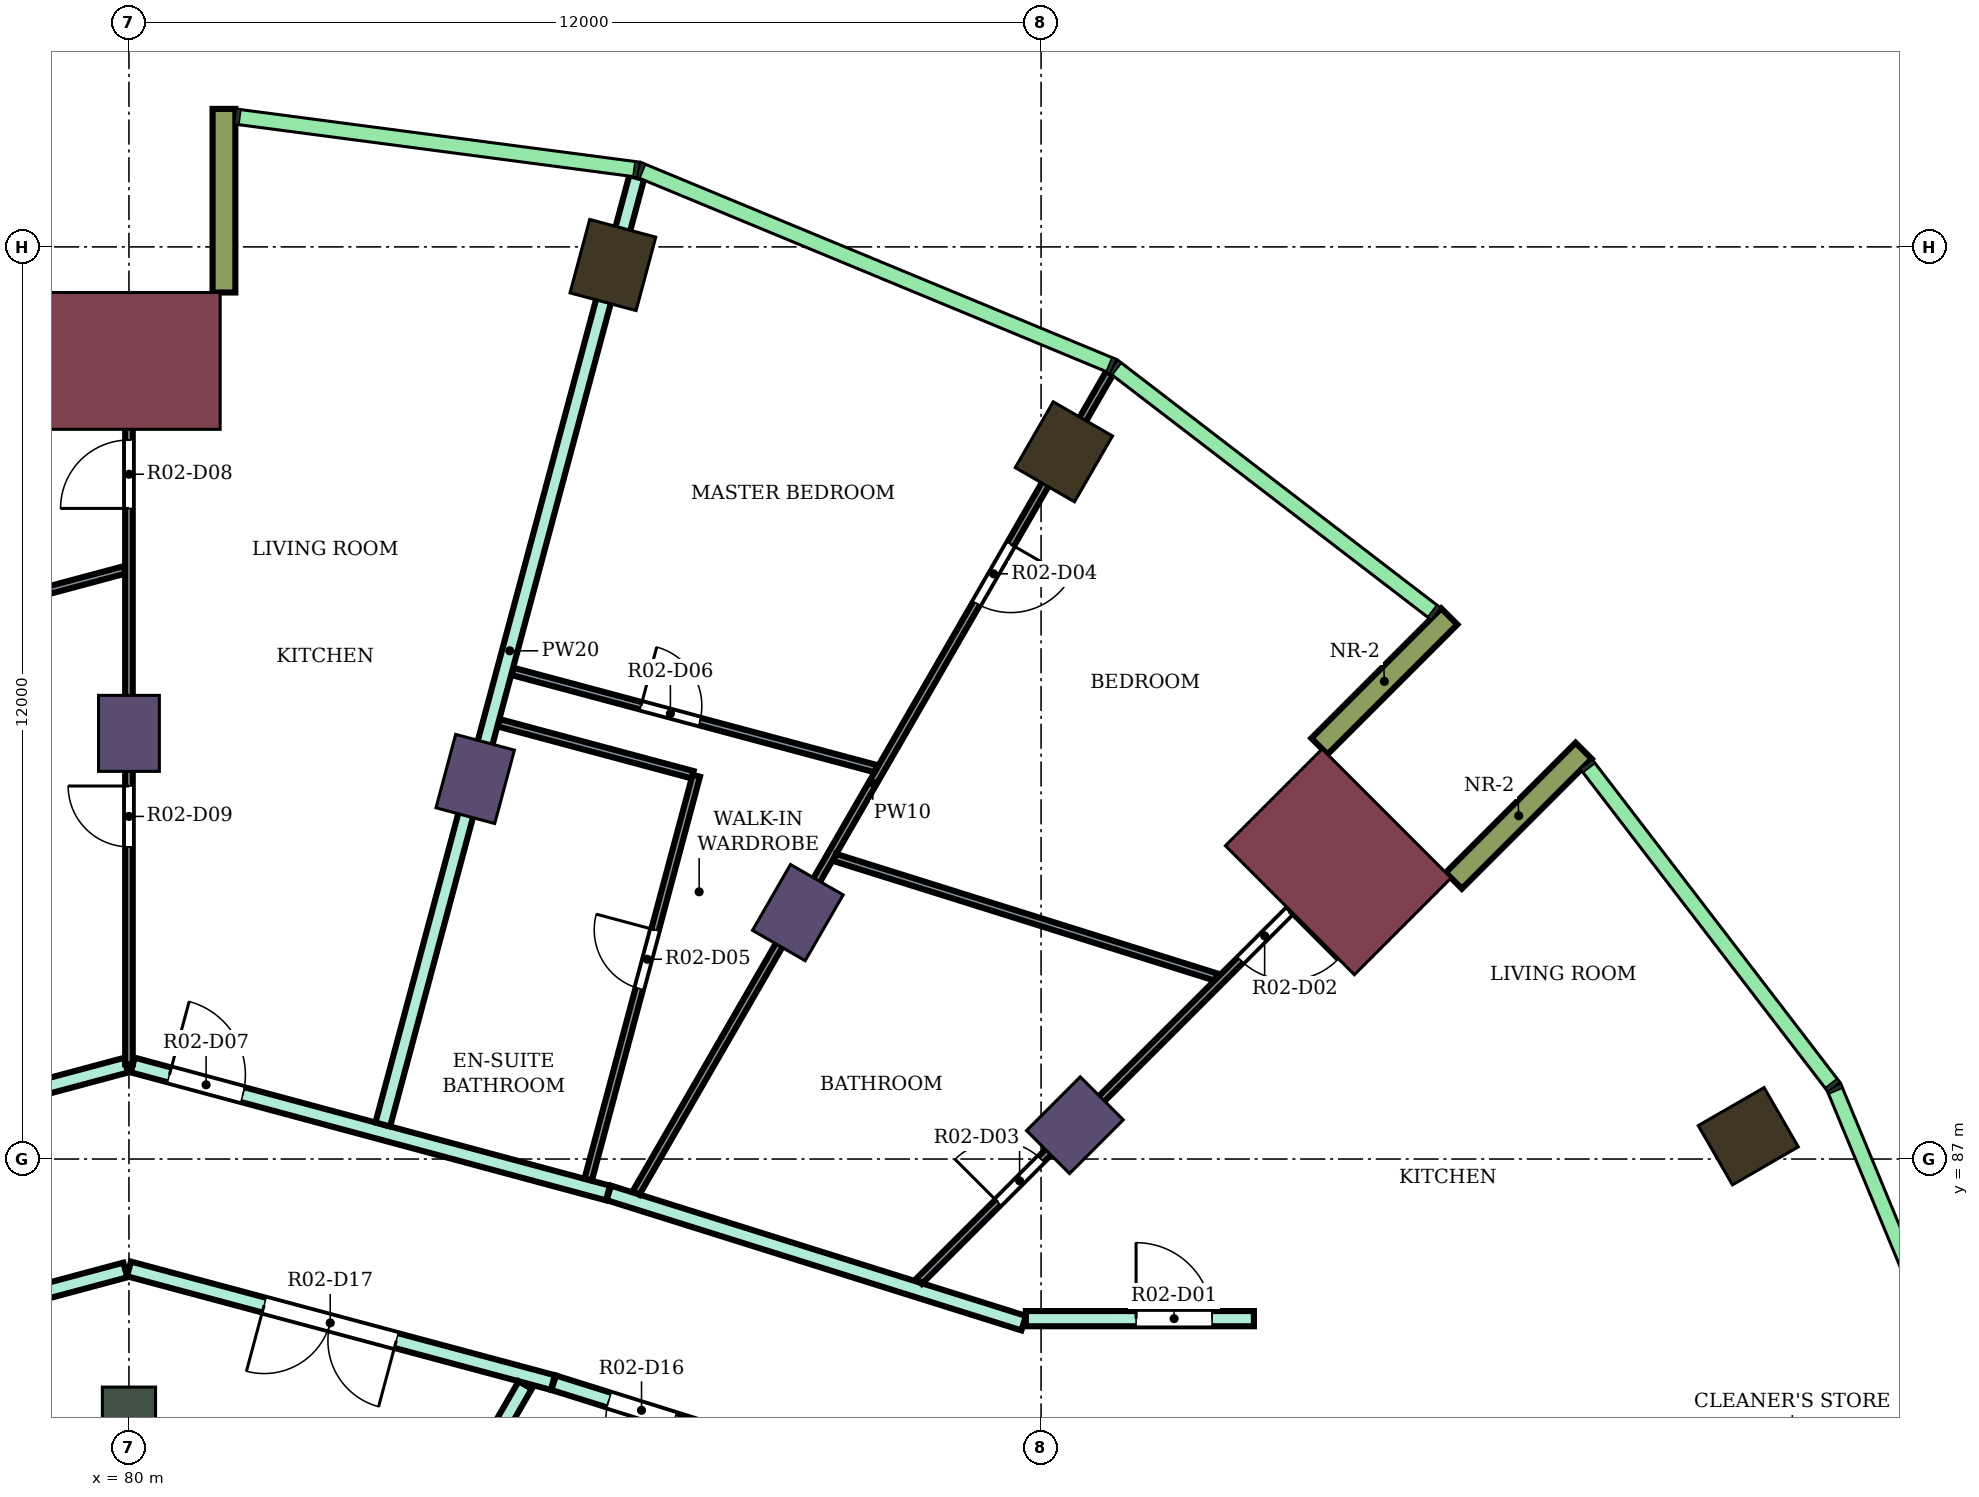
"""IFC4 building model, lengths in metres.
Left out: names, types, materials, properties, quantities, classifications, styles, units other than length and angle.
Written with IfcOpenShell. Run it as: python <this file> out.ifc"""

import sys

from ifc_helpers import new_model, si_unit, direction, frame, frame_2d, origin, origin_2d, place, context, subcontext, project, spatial, rectangle, extrude, element, fill, save


model = new_model("IFC4")
c1 = context("Model", 3, precision=1e-05, world=origin(), true_north=direction((0.0, 1.0)))
c2 = subcontext(c1, "Body", "Model", "MODEL_VIEW")
j1 = project(units=[si_unit("LENGTHUNIT", "METRE"), si_unit("PLANEANGLEUNIT", "RADIAN")], contexts=[c1])
p1 = place(None, origin())
s1 = spatial("IfcSite", under=j1, at=p1, CompositionType="ELEMENT")
p2 = place(p1, origin())
s2 = spatial("IfcBuilding", under=s1, at=p2, CompositionType="ELEMENT")
p3 = place(p2, frame((0.0, 0.0, 170.0)))
s3 = spatial("IfcBuildingStorey", under=s2, at=p3, CompositionType="ELEMENT", Elevation=170.0)
for number, where, z_axis, x_axis in (
    (1, (101.304, 87.3, 0.0), (0.0, 0.0, 1.0), (0.866, 0.5, 0.0)),
    (2, (92.3, 96.304, 0.0), (0.0, 0.0, 1.0), (0.5, 0.866, 0.0)),
    (3, (86.367, 98.762, 0.0), (0.0, 0.0, 1.0), (0.259, 0.966, 0.0)),
):
    element("IfcColumn", number, at=place(p3, frame(where, z_axis=z_axis, x_axis=x_axis)), inside=s3, PredefinedType="COLUMN", context=c2, shape_type="SweptSolid", body=[
        extrude(rectangle(XDim=1.0, YDim=0.9, at=origin_2d()), origin(), (0.0, 0.0, 1.0), 4.1),
    ])
for number, where, z_axis, x_axis in (
    (4, (92.445, 87.445, 0.0), (0.0, 0.0, 1.0), (0.707, 0.707, 0.0)),
    (5, (88.8, 90.242, 0.0), (0.0, 0.0, 1.0), (0.5, 0.866, 0.0)),
    (6, (84.555, 92.0, 0.0), (0.0, 0.0, 1.0), (0.259, 0.966, 0.0)),
    (7, (80.0, 92.6, 0.0), (0.0, 0.0, 1.0), (0.0, 1.0, 0.0)),
):
    element("IfcColumn", number, at=place(p3, frame(where, z_axis=z_axis, x_axis=x_axis)), inside=s3, PredefinedType="COLUMN", context=c2, shape_type="SweptSolid", body=[
        extrude(rectangle(XDim=1.0, YDim=0.8, at=origin_2d()), origin(), (0.0, 0.0, 1.0), 4.1),
    ])
p4 = place(p3, frame((80.0, 83.6, 0.0), z_axis=(0.0, 0.0, 1.0), x_axis=(0.0, 1.0, 0.0)))
e8 = element("IfcColumn", 8, at=p4, inside=s3, PredefinedType="COLUMN", context=c2, shape_type="SweptSolid", body=[
    extrude(rectangle(XDim=0.8, YDim=0.7, at=origin_2d()), origin(), (0.0, 0.0, 1.0), 4.1),
])
for number, where, z_axis, x_axis in (
    (9, (95.91, 90.91, 0.0), (0.0, 0.0, 1.0), (0.707, 0.707, 0.0)),
    (10, (80.0, 97.5, 0.0), (0.0, 0.0, 1.0), (0.0, 1.0, 0.0)),
):
    element("IfcColumn", number, at=place(p3, frame(where, z_axis=z_axis, x_axis=x_axis)), inside=s3, PredefinedType="COLUMN", context=c2, shape_type="SweptSolid", body=[
        extrude(rectangle(XDim=1.8, YDim=2.4, at=origin_2d()), origin(), (0.0, 0.0, 1.0), 4.1),
    ])
for number, where, z_axis, x_axis in (
    (11, (97.43, 90.662, 0.0), (0.0, 0.0, 1.0), (0.707, 0.707, 0.0)),
    (12, (95.662, 92.43, 0.0), (0.0, 0.0, 1.0), (0.707, 0.707, 0.0)),
    (13, (81.25, 98.4, 0.0), (0.0, 0.0, 1.0), (0.0, 1.0, 0.0)),
):
    element("IfcWall", number, at=place(p3, frame(where, z_axis=z_axis, x_axis=x_axis)), inside=s3, PredefinedType="NOTDEFINED", context=c2, shape_type="SweptSolid", body=[
        extrude(rectangle(XDim=2.416, YDim=0.3, at=frame_2d((1.208, 0.0))), origin(), (0.0, 0.0, 1.0), 4.1),
    ])
p5 = place(p3, frame((73.687, 86.554, 0.0), z_axis=(0.0, 0.0, 1.0), x_axis=(0.96595928904, 0.258694128106, 0.0)))
e14 = element("IfcWall", 14, at=p5, inside=s3, PredefinedType="PARTITIONING", context=c2, shape_type="SweptSolid", body=[
    extrude(rectangle(XDim=6.496, YDim=0.2, at=frame_2d((3.248, 0.0))), origin(), (0.0, 0.0, 1.0), 3.65),
])
p6 = place(p3, frame((74.413, 84.057, 0.0), z_axis=(0.0, 0.0, 1.0), x_axis=(0.965970849692, 0.258650956976, 0.0)))
e15 = element("IfcWall", 15, at=p6, inside=s3, PredefinedType="PARTITIONING", context=c2, shape_type="SweptSolid", body=[
    extrude(rectangle(XDim=5.734, YDim=0.2, at=frame_2d((2.867, 0.0))), origin(), (0.0, 0.0, 1.0), 3.65),
])
p7 = place(p3, frame((80.0, 85.554, 0.0), z_axis=(0.0, 0.0, 1.0), x_axis=(0.965894438951, -0.258936155845, 0.0)))
e16 = element("IfcWall", 16, at=p7, inside=s3, PredefinedType="PARTITIONING", context=c2, shape_type="SweptSolid", body=[
    extrude(rectangle(XDim=5.774, YDim=0.2, at=frame_2d((2.887, 0.0))), origin(), (0.0, 0.0, 1.0), 3.65),
])
p8 = place(p7, frame((1.841, 0.0, 0.0)))
e17 = element("IfcOpeningElement", 17, at=p8, cuts=e16, PredefinedType="OPENING", context=c2, shape_type="SweptSolid", body=[
    extrude(rectangle(XDim=1.8, YDim=2.1, at=frame_2d((0.9, 1.05))), frame((0.0, 0.11, 0.0), z_axis=(0.0, -1.0, 0.0), x_axis=(1.0, 0.0, 0.0)), (0.0, 0.0, 1.0), 0.22),
])
p9 = place(p3, frame((80.049, 88.237, 0.0), z_axis=(0.0, 0.0, 1.0), x_axis=(0.965582990495, -0.260095152718, 0.0)))
e18 = element("IfcWall", 18, at=p9, inside=s3, PredefinedType="PARTITIONING", context=c2, shape_type="SweptSolid", body=[
    extrude(rectangle(XDim=6.476, YDim=0.2, at=frame_2d((3.238, 0.0))), origin(), (0.0, 0.0, 1.0), 3.65),
])
p10 = place(p9, frame((0.5, 0.0, 0.0)))
e19 = element("IfcOpeningElement", 19, at=p10, cuts=e18, PredefinedType="OPENING", context=c2, shape_type="SweptSolid", body=[
    extrude(rectangle(XDim=1.0, YDim=2.1, at=frame_2d((0.5, 1.05))), frame((0.0, 0.11, 0.0), z_axis=(0.0, -1.0, 0.0), x_axis=(1.0, 0.0, 0.0)), (0.0, 0.0, 1.0), 0.22),
])
p11 = place(p3, frame((83.339, 87.455, 0.0), z_axis=(0.0, 0.0, 1.0), x_axis=(0.258941302036, 0.96589305935, 0.0)))
e20 = element("IfcWall", 20, at=p11, inside=s3, PredefinedType="PARTITIONING", context=c2, shape_type="SweptSolid", body=[
    extrude(rectangle(XDim=12.904, YDim=0.2, at=frame_2d((6.452, 0.0))), origin(), (0.0, 0.0, 1.0), 3.65),
])
p12 = place(p3, frame((83.851, 81.667, 0.0), z_axis=(0.0, 0.0, 1.0), x_axis=(0.500099931433, 0.865967700657, 0.0)))
e21 = element("IfcWall", 21, at=p12, inside=s3, PredefinedType="PARTITIONING", context=c2, shape_type="SweptSolid", body=[
    extrude(rectangle(XDim=2.725, YDim=0.2, at=frame_2d((1.362, 0.0))), origin(), (0.0, 0.0, 1.0), 3.65),
])
p13 = place(p3, frame((85.587, 84.057, 0.0), z_axis=(0.0, 0.0, 1.0), x_axis=(0.954239513179, -0.299043393987, 0.0)))
e22 = element("IfcWall", 22, at=p13, inside=s3, PredefinedType="PARTITIONING", context=c2, shape_type="SweptSolid", body=[
    extrude(rectangle(XDim=2.424, YDim=0.2, at=frame_2d((1.212, 0.0))), origin(), (0.0, 0.0, 1.0), 3.65),
])
p14 = place(p13, frame((0.762, 0.0, 0.0)))
e23 = element("IfcOpeningElement", 23, at=p14, cuts=e22, PredefinedType="OPENING", context=c2, shape_type="SweptSolid", body=[
    extrude(rectangle(XDim=0.9, YDim=2.1, at=frame_2d((0.45, 1.05))), frame((0.0, 0.11, 0.0), z_axis=(0.0, -1.0, 0.0), x_axis=(1.0, 0.0, 0.0)), (0.0, 0.0, 1.0), 0.22),
])
p15 = place(p3, frame((86.313, 86.554, 0.0), z_axis=(0.0, 0.0, 1.0), x_axis=(0.954081217458, -0.299548043717, 0.0)))
e24 = element("IfcWall", 24, at=p15, inside=s3, PredefinedType="PARTITIONING", context=c2, shape_type="SweptSolid", body=[
    extrude(rectangle(XDim=5.721, YDim=0.2, at=frame_2d((2.86, 0.0))), origin(), (0.0, 0.0, 1.0), 3.65),
])
p16 = place(p3, frame((91.8, 84.9, 0.0), z_axis=(0.0, 0.0, 1.0), x_axis=(1.0, 0.0, 0.0)))
e25 = element("IfcWall", 25, at=p16, inside=s3, PredefinedType="PARTITIONING", context=c2, shape_type="SweptSolid", body=[
    extrude(rectangle(XDim=3.0, YDim=0.2, at=frame_2d((1.5, 0.0))), origin(), (0.0, 0.0, 1.0), 3.65),
])
p17 = place(p16, frame((1.45, 0.0, 0.0)))
e26 = element("IfcOpeningElement", 26, at=p17, cuts=e25, PredefinedType="OPENING", context=c2, shape_type="SweptSolid", body=[
    extrude(rectangle(XDim=1.0, YDim=2.1, at=frame_2d((0.5, 1.05))), frame((0.0, 0.11, 0.0), z_axis=(0.0, -1.0, 0.0), x_axis=(1.0, 0.0, 0.0)), (0.0, 0.0, 1.0), 0.22),
])
p18 = place(p3, frame((70.232, 92.151, 0.0), z_axis=(0.0, 0.0, 1.0), x_axis=(0.965980126086, 0.258616310405, 0.0)))
e27 = element("IfcWall", 27, at=p18, inside=s3, PredefinedType="PARTITIONING", context=c2, shape_type="SweptSolid", body=[
    extrude(rectangle(XDim=10.053, YDim=0.1, at=frame_2d((5.026, 0.0))), origin(), (0.0, 0.0, 1.0), 3.65),
])
p19 = place(p18, frame((2.038, 0.0, 0.0)))
e28 = element("IfcOpeningElement", 28, at=p19, cuts=e27, PredefinedType="OPENING", context=c2, shape_type="SweptSolid", body=[
    extrude(rectangle(XDim=0.8, YDim=2.1, at=frame_2d((0.4, 1.05))), frame((0.0, 0.06, 0.0), z_axis=(0.0, -1.0, 0.0), x_axis=(1.0, 0.0, 0.0)), (0.0, 0.0, 1.0), 0.12),
])
p20 = place(p3, frame((80.0, 88.246, 0.0), z_axis=(0.0, 0.0, 1.0), x_axis=(0.0, 1.0, 0.0)))
e29 = element("IfcWall", 29, at=p20, inside=s3, PredefinedType="PARTITIONING", context=c2, shape_type="SweptSolid", body=[
    extrude(rectangle(XDim=9.954, YDim=0.1, at=frame_2d((4.977, 0.0))), origin(), (0.0, 0.0, 1.0), 3.65),
])
p21 = place(p20, frame((7.313, 0.0, 0.0)))
e30 = element("IfcOpeningElement", 30, at=p21, cuts=e29, PredefinedType="OPENING", context=c2, shape_type="SweptSolid", body=[
    extrude(rectangle(XDim=0.9, YDim=2.1, at=frame_2d((0.45, 1.05))), frame((0.0, 0.06, 0.0), z_axis=(0.0, -1.0, 0.0), x_axis=(1.0, 0.0, 0.0)), (0.0, 0.0, 1.0), 0.12),
])
p22 = place(p20, frame((2.862, 0.0, 0.0)))
e31 = element("IfcOpeningElement", 31, at=p22, cuts=e29, PredefinedType="OPENING", context=c2, shape_type="SweptSolid", body=[
    extrude(rectangle(XDim=0.8, YDim=2.1, at=frame_2d((0.4, 1.05))), frame((0.0, 0.06, 0.0), z_axis=(0.0, -1.0, 0.0), x_axis=(1.0, 0.0, 0.0)), (0.0, 0.0, 1.0), 0.12),
])
p23 = place(p3, frame((84.867, 92.739, 0.0), z_axis=(0.0, 0.0, 1.0), x_axis=(0.96595176814, -0.25872220938, 0.0)))
e32 = element("IfcWall", 32, at=p23, inside=s3, PredefinedType="PARTITIONING", context=c2, shape_type="SweptSolid", body=[
    extrude(rectangle(XDim=2.638, YDim=0.1, at=frame_2d((1.319, 0.0))), origin(), (0.0, 0.0, 1.0), 3.65),
])
p24 = place(p3, frame((85.048, 93.415, 0.0), z_axis=(0.0, 0.0, 1.0), x_axis=(0.965981309458, -0.258611890247, 0.0)))
e33 = element("IfcWall", 33, at=p24, inside=s3, PredefinedType="PARTITIONING", context=c2, shape_type="SweptSolid", body=[
    extrude(rectangle(XDim=4.946, YDim=0.1, at=frame_2d((2.473, 0.0))), origin(), (0.0, 0.0, 1.0), 3.65),
])
p25 = place(p24, frame((1.748, 0.0, 0.0)))
e34 = element("IfcOpeningElement", 34, at=p25, cuts=e33, PredefinedType="OPENING", context=c2, shape_type="SweptSolid", body=[
    extrude(rectangle(XDim=0.8, YDim=2.1, at=frame_2d((0.4, 1.05))), frame((0.0, 0.06, 0.0), z_axis=(0.0, -1.0, 0.0), x_axis=(1.0, 0.0, 0.0)), (0.0, 0.0, 1.0), 0.12),
])
p26 = place(p3, frame((86.042, 86.731, 0.0), z_axis=(0.0, 0.0, 1.0), x_axis=(0.258599239637, 0.965984696183, 0.0)))
e35 = element("IfcWall", 35, at=p26, inside=s3, PredefinedType="PARTITIONING", context=c2, shape_type="SweptSolid", body=[
    extrude(rectangle(XDim=5.499, YDim=0.1, at=frame_2d((2.75, 0.0))), origin(), (0.0, 0.0, 1.0), 3.65),
])
p27 = place(p26, frame((2.6, 0.0, 0.0)))
e36 = element("IfcOpeningElement", 36, at=p27, cuts=e35, PredefinedType="OPENING", context=c2, shape_type="SweptSolid", body=[
    extrude(rectangle(XDim=0.8, YDim=2.1, at=frame_2d((0.4, 1.05))), frame((0.0, 0.06, 0.0), z_axis=(0.0, -1.0, 0.0), x_axis=(1.0, 0.0, 0.0)), (0.0, 0.0, 1.0), 0.12),
])
p28 = place(p3, frame((86.672, 86.554, 0.0), z_axis=(0.0, 0.0, 1.0), x_axis=(0.500043115992, 0.866000509324, 0.0)))
e37 = element("IfcWall", 37, at=p28, inside=s3, PredefinedType="PARTITIONING", context=c2, shape_type="SweptSolid", body=[
    extrude(rectangle(XDim=12.456, YDim=0.1, at=frame_2d((6.228, 0.0))), origin(), (0.0, 0.0, 1.0), 3.65),
])
p29 = place(p28, frame((8.956, 0.0, 0.0)))
e38 = element("IfcOpeningElement", 38, at=p29, cuts=e37, PredefinedType="OPENING", context=c2, shape_type="SweptSolid", body=[
    extrude(rectangle(XDim=0.9, YDim=2.1, at=frame_2d((0.45, 1.05))), frame((0.0, 0.06, 0.0), z_axis=(0.0, -1.0, 0.0), x_axis=(1.0, 0.0, 0.0)), (0.0, 0.0, 1.0), 0.12),
])
p30 = place(p3, frame((89.286, 90.967, 0.0), z_axis=(0.0, 0.0, 1.0), x_axis=(0.954193783918, -0.299189275763, 0.0)))
e39 = element("IfcWall", 39, at=p30, inside=s3, PredefinedType="PARTITIONING", context=c2, shape_type="SweptSolid", body=[
    extrude(rectangle(XDim=5.26, YDim=0.1, at=frame_2d((2.63, 0.0))), origin(), (0.0, 0.0, 1.0), 3.65),
])
p31 = place(p3, frame((90.396, 85.393, 0.0), z_axis=(0.0, 0.0, 1.0), x_axis=(0.707279106146, 0.706934414221, 0.0)))
e40 = element("IfcWall", 40, at=p31, inside=s3, PredefinedType="PARTITIONING", context=c2, shape_type="SweptSolid", body=[
    extrude(rectangle(XDim=8.5, YDim=0.1, at=frame_2d((4.25, 0.0))), origin(), (0.0, 0.0, 1.0), 3.65),
])
p32 = place(p31, frame((5.976, 0.0, 0.0)))
e41 = element("IfcOpeningElement", 41, at=p32, cuts=e40, PredefinedType="OPENING", context=c2, shape_type="SweptSolid", body=[
    extrude(rectangle(XDim=0.9, YDim=2.1, at=frame_2d((0.45, 1.05))), frame((0.0, 0.06, 0.0), z_axis=(0.0, -1.0, 0.0), x_axis=(1.0, 0.0, 0.0)), (0.0, 0.0, 1.0), 0.12),
])
p33 = place(p31, frame((1.467, 0.0, 0.0)))
e42 = element("IfcOpeningElement", 42, at=p33, cuts=e40, PredefinedType="OPENING", context=c2, shape_type="SweptSolid", body=[
    extrude(rectangle(XDim=0.8, YDim=2.1, at=frame_2d((0.4, 1.05))), frame((0.0, 0.06, 0.0), z_axis=(0.0, -1.0, 0.0), x_axis=(1.0, 0.0, 0.0)), (0.0, 0.0, 1.0), 0.12),
])
p34 = place(p17, origin())
e43 = element("IfcDoor", 43, at=p34, inside=s3, OperationType="SINGLE_SWING_LEFT", PredefinedType="DOOR", context=c2, shape_type="SweptSolid", body=[
    extrude(rectangle(XDim=1.0, YDim=2.1, at=frame_2d((0.5, 1.05))), frame((0.0, 0.025, 0.0), z_axis=(0.0, -1.0, 0.0), x_axis=(1.0, 0.0, 0.0)), (0.0, 0.0, 1.0), 0.05),
])
fill(e26, e43)
p35 = place(p32, frame((0.9, 0.0, 0.0), z_axis=(0.0, 0.0, 1.0), x_axis=(-1.0, 0.0, 0.0)))
e44 = element("IfcDoor", 44, at=p35, inside=s3, OperationType="SINGLE_SWING_LEFT", PredefinedType="DOOR", context=c2, shape_type="SweptSolid", body=[
    extrude(rectangle(XDim=0.9, YDim=2.1, at=frame_2d((0.45, 1.05))), frame((0.0, 0.025, 0.0), z_axis=(0.0, -1.0, 0.0), x_axis=(1.0, 0.0, 0.0)), (0.0, 0.0, 1.0), 0.05),
])
fill(e41, e44)
p36 = place(p33, origin())
e45 = element("IfcDoor", 45, at=p36, inside=s3, OperationType="SINGLE_SWING_LEFT", PredefinedType="DOOR", context=c2, shape_type="SweptSolid", body=[
    extrude(rectangle(XDim=0.8, YDim=2.1, at=frame_2d((0.4, 1.05))), frame((0.0, 0.025, 0.0), z_axis=(0.0, -1.0, 0.0), x_axis=(1.0, 0.0, 0.0)), (0.0, 0.0, 1.0), 0.05),
])
fill(e42, e45)
p37 = place(p29, frame((0.9, 0.0, 0.0), z_axis=(0.0, 0.0, 1.0), x_axis=(-1.0, 0.0, 0.0)))
e46 = element("IfcDoor", 46, at=p37, inside=s3, OperationType="SINGLE_SWING_LEFT", PredefinedType="DOOR", context=c2, shape_type="SweptSolid", body=[
    extrude(rectangle(XDim=0.9, YDim=2.1, at=frame_2d((0.45, 1.05))), frame((0.0, 0.025, 0.0), z_axis=(0.0, -1.0, 0.0), x_axis=(1.0, 0.0, 0.0)), (0.0, 0.0, 1.0), 0.05),
])
fill(e38, e46)
p38 = place(p27, origin())
e47 = element("IfcDoor", 47, at=p38, inside=s3, OperationType="SINGLE_SWING_RIGHT", PredefinedType="DOOR", context=c2, shape_type="SweptSolid", body=[
    extrude(rectangle(XDim=0.8, YDim=2.1, at=frame_2d((0.4, 1.05))), frame((0.0, 0.025, 0.0), z_axis=(0.0, -1.0, 0.0), x_axis=(1.0, 0.0, 0.0)), (0.0, 0.0, 1.0), 0.05),
])
fill(e36, e47)
p39 = place(p25, origin())
e48 = element("IfcDoor", 48, at=p39, inside=s3, OperationType="SINGLE_SWING_LEFT", PredefinedType="DOOR", context=c2, shape_type="SweptSolid", body=[
    extrude(rectangle(XDim=0.8, YDim=2.1, at=frame_2d((0.4, 1.05))), frame((0.0, 0.025, 0.0), z_axis=(0.0, -1.0, 0.0), x_axis=(1.0, 0.0, 0.0)), (0.0, 0.0, 1.0), 0.05),
])
fill(e34, e48)
p40 = place(p10, origin())
e49 = element("IfcDoor", 49, at=p40, inside=s3, OperationType="SINGLE_SWING_LEFT", PredefinedType="DOOR", context=c2, shape_type="SweptSolid", body=[
    extrude(rectangle(XDim=1.0, YDim=2.1, at=frame_2d((0.5, 1.05))), frame((0.0, 0.025, 0.0), z_axis=(0.0, -1.0, 0.0), x_axis=(1.0, 0.0, 0.0)), (0.0, 0.0, 1.0), 0.05),
])
fill(e19, e49)
p41 = place(p21, origin())
e50 = element("IfcDoor", 50, at=p41, inside=s3, OperationType="SINGLE_SWING_LEFT", PredefinedType="DOOR", context=c2, shape_type="SweptSolid", body=[
    extrude(rectangle(XDim=0.9, YDim=2.1, at=frame_2d((0.45, 1.05))), frame((0.0, 0.025, 0.0), z_axis=(0.0, -1.0, 0.0), x_axis=(1.0, 0.0, 0.0)), (0.0, 0.0, 1.0), 0.05),
])
fill(e30, e50)
p42 = place(p22, origin())
e51 = element("IfcDoor", 51, at=p42, inside=s3, OperationType="SINGLE_SWING_RIGHT", PredefinedType="DOOR", context=c2, shape_type="SweptSolid", body=[
    extrude(rectangle(XDim=0.8, YDim=2.1, at=frame_2d((0.4, 1.05))), frame((0.0, 0.025, 0.0), z_axis=(0.0, -1.0, 0.0), x_axis=(1.0, 0.0, 0.0)), (0.0, 0.0, 1.0), 0.05),
])
fill(e31, e51)
p43 = place(p14, frame((0.9, 0.0, 0.0), z_axis=(0.0, 0.0, 1.0), x_axis=(-1.0, 0.0, 0.0)))
e52 = element("IfcDoor", 52, at=p43, inside=s3, OperationType="SINGLE_SWING_LEFT", PredefinedType="DOOR", context=c2, shape_type="SweptSolid", body=[
    extrude(rectangle(XDim=0.9, YDim=2.1, at=frame_2d((0.45, 1.05))), frame((0.0, 0.025, 0.0), z_axis=(0.0, -1.0, 0.0), x_axis=(1.0, 0.0, 0.0)), (0.0, 0.0, 1.0), 0.05),
])
fill(e23, e52)
p44 = place(p8, frame((1.8, 0.0, 0.0), z_axis=(0.0, 0.0, 1.0), x_axis=(-1.0, 0.0, 0.0)))
e53 = element("IfcDoor", 53, at=p44, inside=s3, OperationType="DOUBLE_DOOR_SINGLE_SWING", PredefinedType="DOOR", context=c2, shape_type="SweptSolid", body=[
    extrude(rectangle(XDim=1.8, YDim=2.1, at=frame_2d((0.9, 1.05))), frame((0.0, 0.025, 0.0), z_axis=(0.0, -1.0, 0.0), x_axis=(1.0, 0.0, 0.0)), (0.0, 0.0, 1.0), 0.05),
])
fill(e17, e53)
save(model, sys.argv[1])
